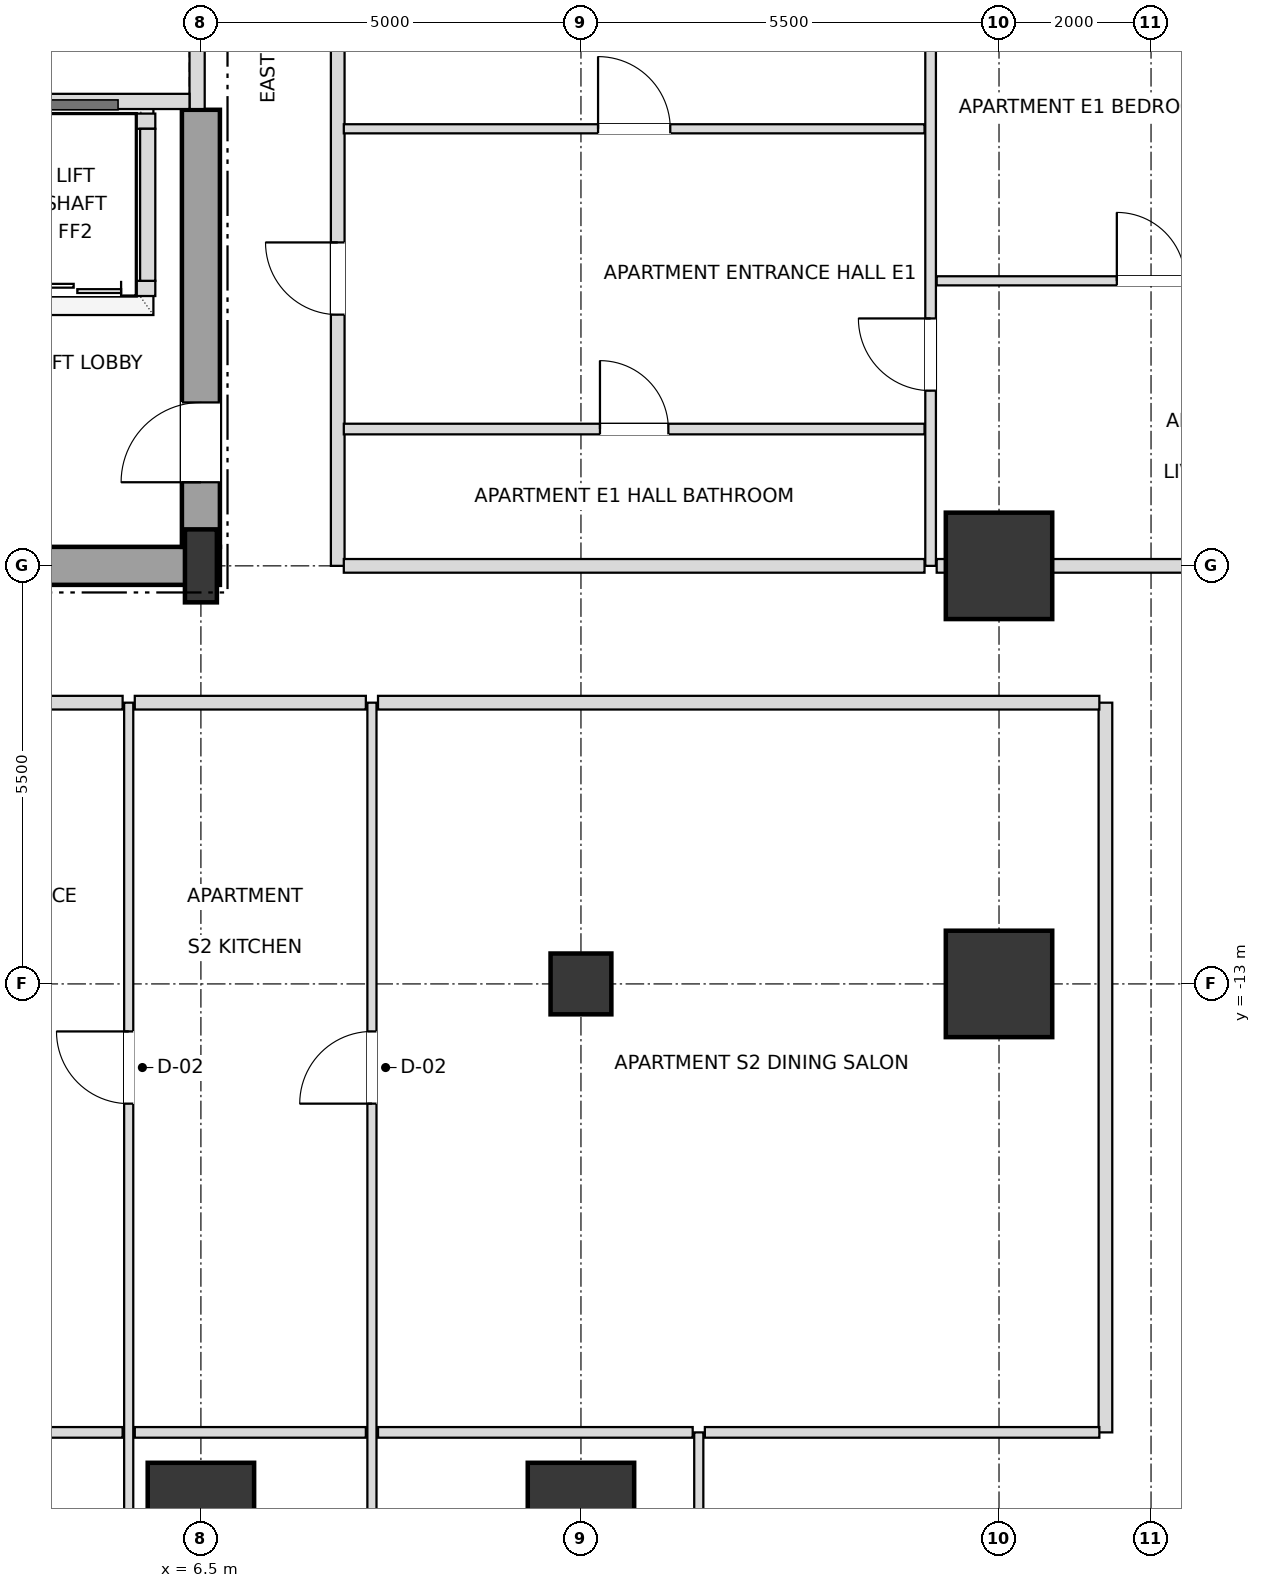
"""IFC4 building model, lengths in metres.
Left out: names, types, materials, properties, quantities, classifications, styles, units other than length and angle.
Written with IfcOpenShell. Run it as: python <this file> out.ifc"""

import sys

from ifc_helpers import new_model, si_unit, direction, frame, frame_2d, origin, origin_2d, place, context, subcontext, project, spatial, rectangle, i_section, extrude, element, fill, save


model = new_model("IFC4")
c1 = context("Model", 3, precision=1e-05, world=origin(), true_north=direction((0.0, 1.0)))
c2 = subcontext(c1, "Body", "Model", "MODEL_VIEW")
j1 = project(units=[si_unit("LENGTHUNIT", "METRE"), si_unit("PLANEANGLEUNIT", "RADIAN")], contexts=[c1])
p1 = place(None, origin())
s1 = spatial("IfcSite", under=j1, at=p1, CompositionType="ELEMENT")
p2 = place(p1, origin())
s2 = spatial("IfcBuilding", under=s1, at=p2, CompositionType="ELEMENT")
p3 = place(p2, frame((0.0, 0.0, 68.4)))
s3 = spatial("IfcBuildingStorey", under=s2, at=p3, CompositionType="ELEMENT", Elevation=68.4)
p4 = place(p3, frame((6.5, -7.5, 0.0), z_axis=(0.0, 0.0, 1.0), x_axis=(1.0, 0.0, 0.0)))
e1 = element("IfcColumn", 1, at=p4, inside=s3, PredefinedType="COLUMN", context=c2, shape_type="SweptSolid", body=[
    extrude(i_section(OverallWidth=0.42, OverallDepth=0.96, WebThickness=0.022, FlangeThickness=0.034, at=origin_2d()), origin(), (0.0, 0.0, 1.0), 3.6),
])
for number, where, z_axis, x_axis in (
    (2, (6.5, -20.0, 0.0), (0.0, 0.0, 1.0), (1.0, 0.0, 0.0)),
    (3, (11.5, -20.0, 0.0), (0.0, 0.0, 1.0), (1.0, 0.0, 0.0)),
    (4, (17.0, -13.0, 0.0), (0.0, 0.0, 1.0), (1.0, 0.0, 0.0)),
    (5, (17.0, -7.5, 0.0), (0.0, 0.0, 1.0), (1.0, 0.0, 0.0)),
):
    element("IfcColumn", number, at=place(p3, frame(where, z_axis=z_axis, x_axis=x_axis)), inside=s3, PredefinedType="USERDEFINED", context=c2, shape_type="SweptSolid", body=[
        extrude(rectangle(XDim=1.4, YDim=1.4, at=origin_2d()), origin(), (0.0, 0.0, 1.0), 3.6),
    ])
p5 = place(p3, frame((11.5, -13.0, 0.0), z_axis=(0.0, 0.0, 1.0), x_axis=(1.0, 0.0, 0.0)))
e6 = element("IfcColumn", 6, at=p5, inside=s3, PredefinedType="COLUMN", context=c2, shape_type="SweptSolid", body=[
    extrude(rectangle(XDim=0.8, YDim=0.8, at=origin_2d()), origin(), (0.0, 0.0, 1.0), 3.6),
])
p6 = place(p3, frame((0.0, -7.5, 0.0), z_axis=(0.0, 0.0, 1.0), x_axis=(1.0, 0.0, 0.0)))
e7 = element("IfcWall", 7, at=p6, inside=s3, PredefinedType="SHEAR", context=c2, shape_type="SweptSolid", body=[
    extrude(rectangle(XDim=6.75, YDim=0.5, at=frame_2d((3.375, 0.0))), origin(), (0.0, 0.0, 1.0), 3.38),
])
p7 = place(p3, frame((6.5, -7.25, 0.0), z_axis=(0.0, 0.0, 1.0), x_axis=(0.0, 1.0, 0.0)))
e8 = element("IfcWall", 8, at=p7, inside=s3, PredefinedType="SHEAR", context=c2, shape_type="SweptSolid", body=[
    extrude(rectangle(XDim=5.75, YDim=0.5, at=frame_2d((2.875, 0.0))), origin(), (0.0, 0.0, 1.0), 3.38),
])
p8 = place(p7, frame((0.85, 0.0, 0.0)))
e9 = element("IfcOpeningElement", 9, at=p8, cuts=e8, PredefinedType="OPENING", context=c2, shape_type="SweptSolid", body=[
    extrude(rectangle(XDim=1.05, YDim=2.15, at=frame_2d((0.525, 1.075))), frame((0.0, 0.26, 0.0), z_axis=(0.0, -1.0, 0.0), x_axis=(1.0, 0.0, 0.0)), (0.0, 0.0, 1.0), 0.52),
])
p9 = place(p3, frame((6.45, -1.49, 0.0), z_axis=(0.0, 0.0, 1.0), x_axis=(0.0, 1.0, 0.0)))
e10 = element("IfcWall", 10, at=p9, inside=s3, PredefinedType="SOLIDWALL", context=c2, shape_type="SweptSolid", body=[
    extrude(rectangle(XDim=5.58, YDim=0.2, at=frame_2d((2.79, 0.0))), origin(), (0.0, 0.0, 1.0), 2.816),
])
p10 = place(p3, frame((4.15, -1.39, 0.0), z_axis=(0.0, 0.0, 1.0), x_axis=(1.0, 0.0, 0.0)))
e11 = element("IfcWall", 11, at=p10, inside=s3, PredefinedType="SOLIDWALL", context=c2, shape_type="SweptSolid", body=[
    extrude(rectangle(XDim=2.2, YDim=0.2, at=frame_2d((1.1, 0.0))), origin(), (0.0, 0.0, 1.0), 3.38),
])
p11 = place(p3, frame((1.8, -3.85, 0.0), z_axis=(0.0, 0.0, 1.0), x_axis=(1.0, 0.0, 0.0)))
e12 = element("IfcWall", 12, at=p11, inside=s3, PredefinedType="SOLIDWALL", context=c2, shape_type="SweptSolid", body=[
    extrude(rectangle(XDim=4.1, YDim=0.2, at=frame_2d((2.05, 0.0))), origin(), (0.0, 0.0, 1.0), 3.38),
])
p12 = place(p11, frame((0.45, 0.0, 0.0)))
e13 = element("IfcOpeningElement", 13, at=p12, cuts=e12, PredefinedType="OPENING", context=c2, shape_type="SweptSolid", body=[
    extrude(rectangle(XDim=1.2, YDim=2.2, at=frame_2d((0.6, 1.1))), frame((0.0, 0.11, 0.0), z_axis=(0.0, -1.0, 0.0), x_axis=(1.0, 0.0, 0.0)), (0.0, 0.0, 1.0), 0.22),
])
p13 = place(p11, frame((2.45, 0.0, 0.0)))
e14 = element("IfcOpeningElement", 14, at=p13, cuts=e12, PredefinedType="OPENING", context=c2, shape_type="SweptSolid", body=[
    extrude(rectangle(XDim=1.2, YDim=2.2, at=frame_2d((0.6, 1.1))), frame((0.0, 0.11, 0.0), z_axis=(0.0, -1.0, 0.0), x_axis=(1.0, 0.0, 0.0)), (0.0, 0.0, 1.0), 0.22),
])
p14 = place(p3, frame((1.8, -1.65, 0.0), z_axis=(0.0, 0.0, 1.0), x_axis=(1.0, 0.0, 0.0)))
e15 = element("IfcWall", 15, at=p14, inside=s3, PredefinedType="SOLIDWALL", context=c2, shape_type="SweptSolid", body=[
    extrude(rectangle(XDim=4.1, YDim=0.2, at=frame_2d((2.05, 0.0))), origin(), (0.0, 0.0, 1.0), 3.38),
])
p15 = place(p3, frame((5.8, -3.75, 0.0), z_axis=(0.0, 0.0, 1.0), x_axis=(0.0, 1.0, 0.0)))
e16 = element("IfcWall", 16, at=p15, inside=s3, PredefinedType="SOLIDWALL", context=c2, shape_type="SweptSolid", body=[
    extrude(rectangle(XDim=2.0, YDim=0.2, at=frame_2d((1.0, 0.0))), origin(), (0.0, 0.0, 1.0), 3.38),
])
p16 = place(p3, frame((5.55, -24.9, 0.0), z_axis=(0.0, 0.0, 1.0), x_axis=(0.0, 1.0, 0.0)))
e17 = element("IfcWall", 17, at=p16, inside=s3, PredefinedType="PARTITIONING", context=c2, shape_type="SweptSolid", body=[
    extrude(rectangle(XDim=15.6, YDim=0.12, at=frame_2d((7.8, 0.0))), origin(), (0.0, 0.0, 1.0), 2.816),
])
p17 = place(p16, frame((10.325, 0.0, 0.0)))
e18 = element("IfcOpeningElement", 18, at=p17, cuts=e17, PredefinedType="OPENING", context=c2, shape_type="SweptSolid", body=[
    extrude(rectangle(XDim=0.95, YDim=2.1, at=frame_2d((0.475, 1.05))), frame((0.0, 0.07, 0.0), z_axis=(0.0, -1.0, 0.0), x_axis=(1.0, 0.0, 0.0)), (0.0, 0.0, 1.0), 0.14),
])
p18 = place(p16, frame((2.55, 0.0, 0.0)))
e19 = element("IfcOpeningElement", 19, at=p18, cuts=e17, PredefinedType="OPENING", context=c2, shape_type="SweptSolid", body=[
    extrude(rectangle(XDim=0.9, YDim=2.1, at=frame_2d((0.45, 1.05))), frame((0.0, 0.07, 0.0), z_axis=(0.0, -1.0, 0.0), x_axis=(1.0, 0.0, 0.0)), (0.0, 0.0, 1.0), 0.14),
])
p19 = place(p3, frame((8.3, -7.5, 0.0), z_axis=(0.0, 0.0, 1.0), x_axis=(0.0, 1.0, 0.0)))
e20 = element("IfcWall", 20, at=p19, inside=s3, PredefinedType="PARTITIONING", context=c2, shape_type="SweptSolid", body=[
    extrude(rectangle(XDim=15.0, YDim=0.18, at=frame_2d((7.5, 0.0))), origin(), (0.0, 0.0, 1.0), 3.38),
])
p20 = place(p19, frame((3.305, 0.0, 0.0)))
e21 = element("IfcOpeningElement", 21, at=p20, cuts=e20, PredefinedType="OPENING", context=c2, shape_type="SweptSolid", body=[
    extrude(rectangle(XDim=0.95, YDim=2.15, at=frame_2d((0.475, 1.075))), frame((0.0, 0.1, 0.0), z_axis=(0.0, -1.0, 0.0), x_axis=(1.0, 0.0, 0.0)), (0.0, 0.0, 1.0), 0.2),
])
p21 = place(p19, frame((10.805, 0.0, 0.0)))
e22 = element("IfcOpeningElement", 22, at=p21, cuts=e20, PredefinedType="OPENING", context=c2, shape_type="SweptSolid", body=[
    extrude(rectangle(XDim=0.95, YDim=2.15, at=frame_2d((0.475, 1.075))), frame((0.0, 0.1, 0.0), z_axis=(0.0, -1.0, 0.0), x_axis=(1.0, 0.0, 0.0)), (0.0, 0.0, 1.0), 0.2),
])
p22 = place(p3, frame((8.75, -24.9, 0.0), z_axis=(0.0, 0.0, 1.0), x_axis=(0.0, 1.0, 0.0)))
e23 = element("IfcWall", 23, at=p22, inside=s3, PredefinedType="PARTITIONING", context=c2, shape_type="SweptSolid", body=[
    extrude(rectangle(XDim=15.6, YDim=0.12, at=frame_2d((7.8, 0.0))), origin(), (0.0, 0.0, 1.0), 2.816),
])
p23 = place(p22, frame((10.325, 0.0, 0.0)))
e24 = element("IfcOpeningElement", 24, at=p23, cuts=e23, PredefinedType="OPENING", context=c2, shape_type="SweptSolid", body=[
    extrude(rectangle(XDim=0.95, YDim=2.1, at=frame_2d((0.475, 1.05))), frame((0.0, 0.07, 0.0), z_axis=(0.0, -1.0, 0.0), x_axis=(1.0, 0.0, 0.0)), (0.0, 0.0, 1.0), 0.14),
])
p24 = place(p22, frame((2.55, 0.0, 0.0)))
e25 = element("IfcOpeningElement", 25, at=p24, cuts=e23, PredefinedType="OPENING", context=c2, shape_type="SweptSolid", body=[
    extrude(rectangle(XDim=0.9, YDim=2.1, at=frame_2d((0.45, 1.05))), frame((0.0, 0.07, 0.0), z_axis=(0.0, -1.0, 0.0), x_axis=(1.0, 0.0, 0.0)), (0.0, 0.0, 1.0), 0.14),
])
p25 = place(p3, frame((13.05, -24.9, 0.0), z_axis=(0.0, 0.0, 1.0), x_axis=(0.0, 1.0, 0.0)))
e26 = element("IfcWall", 26, at=p25, inside=s3, PredefinedType="PARTITIONING", context=c2, shape_type="SweptSolid", body=[
    extrude(rectangle(XDim=6.0, YDim=0.12, at=frame_2d((3.0, 0.0))), origin(), (0.0, 0.0, 1.0), 2.736),
])
p26 = place(p25, frame((2.55, 0.0, 0.0)))
e27 = element("IfcOpeningElement", 27, at=p26, cuts=e26, PredefinedType="OPENING", context=c2, shape_type="SweptSolid", body=[
    extrude(rectangle(XDim=0.9, YDim=2.1, at=frame_2d((0.45, 1.05))), frame((0.0, 0.07, 0.0), z_axis=(0.0, -1.0, 0.0), x_axis=(1.0, 0.0, 0.0)), (0.0, 0.0, 1.0), 0.14),
])
p27 = place(p3, frame((16.1, -7.5, 0.0), z_axis=(0.0, 0.0, 1.0), x_axis=(0.0, 1.0, 0.0)))
e28 = element("IfcWall", 28, at=p27, inside=s3, PredefinedType="PARTITIONING", context=c2, shape_type="SweptSolid", body=[
    extrude(rectangle(XDim=15.0, YDim=0.14, at=frame_2d((7.5, 0.0))), origin(), (0.0, 0.0, 1.0), 3.38),
])
p28 = place(p27, frame((2.305, 0.0, 0.0)))
e29 = element("IfcOpeningElement", 29, at=p28, cuts=e28, PredefinedType="OPENING", context=c2, shape_type="SweptSolid", body=[
    extrude(rectangle(XDim=0.95, YDim=2.1, at=frame_2d((0.475, 1.05))), frame((0.0, 0.08, 0.0), z_axis=(0.0, -1.0, 0.0), x_axis=(1.0, 0.0, 0.0)), (0.0, 0.0, 1.0), 0.16),
])
p29 = place(p27, frame((10.105, 0.0, 0.0)))
e30 = element("IfcOpeningElement", 30, at=p29, cuts=e28, PredefinedType="OPENING", context=c2, shape_type="SweptSolid", body=[
    extrude(rectangle(XDim=0.95, YDim=2.1, at=frame_2d((0.475, 1.05))), frame((0.0, 0.08, 0.0), z_axis=(0.0, -1.0, 0.0), x_axis=(1.0, 0.0, 0.0)), (0.0, 0.0, 1.0), 0.16),
])
p30 = place(p3, frame((18.4, -18.9, 0.0), z_axis=(0.0, 0.0, 1.0), x_axis=(0.0, 1.0, 0.0)))
e31 = element("IfcWall", 31, at=p30, inside=s3, PredefinedType="PARTITIONING", context=c2, shape_type="SweptSolid", body=[
    extrude(rectangle(XDim=9.6, YDim=0.18, at=frame_2d((4.8, 0.0))), origin(), (0.0, 0.0, 1.0), 2.736),
])
p31 = place(p3, frame((1.43, -18.9, 0.0), z_axis=(0.0, 0.0, 1.0), x_axis=(1.0, 0.0, 0.0)))
e32 = element("IfcWall", 32, at=p31, inside=s3, PredefinedType="PARTITIONING", context=c2, shape_type="SweptSolid", body=[
    extrude(rectangle(XDim=4.04, YDim=0.14, at=frame_2d((2.02, 0.0))), origin(), (0.0, 0.0, 1.0), 3.38),
])
p32 = place(p31, frame((1.545, 0.0, 0.0)))
e33 = element("IfcOpeningElement", 33, at=p32, cuts=e32, PredefinedType="OPENING", context=c2, shape_type="SweptSolid", body=[
    extrude(rectangle(XDim=0.95, YDim=2.1, at=frame_2d((0.475, 1.05))), frame((0.0, 0.08, 0.0), z_axis=(0.0, -1.0, 0.0), x_axis=(1.0, 0.0, 0.0)), (0.0, 0.0, 1.0), 0.16),
])
p33 = place(p3, frame((5.63, -18.9, 0.0), z_axis=(0.0, 0.0, 1.0), x_axis=(1.0, 0.0, 0.0)))
e34 = element("IfcWall", 34, at=p33, inside=s3, PredefinedType="PARTITIONING", context=c2, shape_type="SweptSolid", body=[
    extrude(rectangle(XDim=3.04, YDim=0.14, at=frame_2d((1.52, 0.0))), origin(), (0.0, 0.0, 1.0), 2.816),
])
p34 = place(p3, frame((8.83, -18.9, 0.0), z_axis=(0.0, 0.0, 1.0), x_axis=(1.0, 0.0, 0.0)))
e35 = element("IfcWall", 35, at=p34, inside=s3, PredefinedType="PARTITIONING", context=c2, shape_type="SweptSolid", body=[
    extrude(rectangle(XDim=4.14, YDim=0.14, at=frame_2d((2.07, 0.0))), origin(), (0.0, 0.0, 1.0), 2.736),
])
p35 = place(p3, frame((13.13, -18.9, 0.0), z_axis=(0.0, 0.0, 1.0), x_axis=(1.0, 0.0, 0.0)))
e36 = element("IfcWall", 36, at=p35, inside=s3, PredefinedType="PARTITIONING", context=c2, shape_type="SweptSolid", body=[
    extrude(rectangle(XDim=5.19, YDim=0.14, at=frame_2d((2.595, 0.0))), origin(), (0.0, 0.0, 1.0), 2.736),
])
p36 = place(p3, frame((1.43, -9.3, 0.0), z_axis=(0.0, 0.0, 1.0), x_axis=(1.0, 0.0, 0.0)))
e37 = element("IfcWall", 37, at=p36, inside=s3, PredefinedType="PARTITIONING", context=c2, shape_type="SweptSolid", body=[
    extrude(rectangle(XDim=4.04, YDim=0.18, at=frame_2d((2.02, 0.0))), origin(), (0.0, 0.0, 1.0), 3.38),
])
p37 = place(p36, frame((1.545, 0.0, 0.0)))
e38 = element("IfcOpeningElement", 38, at=p37, cuts=e37, PredefinedType="OPENING", context=c2, shape_type="SweptSolid", body=[
    extrude(rectangle(XDim=0.95, YDim=2.15, at=frame_2d((0.475, 1.075))), frame((0.0, 0.1, 0.0), z_axis=(0.0, -1.0, 0.0), x_axis=(1.0, 0.0, 0.0)), (0.0, 0.0, 1.0), 0.2),
])
p38 = place(p3, frame((5.63, -9.3, 0.0), z_axis=(0.0, 0.0, 1.0), x_axis=(1.0, 0.0, 0.0)))
e39 = element("IfcWall", 39, at=p38, inside=s3, PredefinedType="PARTITIONING", context=c2, shape_type="SweptSolid", body=[
    extrude(rectangle(XDim=3.04, YDim=0.18, at=frame_2d((1.52, 0.0))), origin(), (0.0, 0.0, 1.0), 2.816),
])
p39 = place(p3, frame((8.83, -9.3, 0.0), z_axis=(0.0, 0.0, 1.0), x_axis=(1.0, 0.0, 0.0)))
e40 = element("IfcWall", 40, at=p39, inside=s3, PredefinedType="PARTITIONING", context=c2, shape_type="SweptSolid", body=[
    extrude(rectangle(XDim=9.49, YDim=0.18, at=frame_2d((4.745, 0.0))), origin(), (0.0, 0.0, 1.0), 2.816),
])
p40 = place(p3, frame((8.38, -7.5, 0.0), z_axis=(0.0, 0.0, 1.0), x_axis=(1.0, 0.0, 0.0)))
e41 = element("IfcWall", 41, at=p40, inside=s3, PredefinedType="PARTITIONING", context=c2, shape_type="SweptSolid", body=[
    extrude(rectangle(XDim=7.64, YDim=0.18, at=frame_2d((3.82, 0.0))), origin(), (0.0, 0.0, 1.0), 2.816),
])
p41 = place(p3, frame((16.18, -7.5, 0.0), z_axis=(0.0, 0.0, 1.0), x_axis=(1.0, 0.0, 0.0)))
e42 = element("IfcWall", 42, at=p41, inside=s3, PredefinedType="PARTITIONING", context=c2, shape_type="SweptSolid", body=[
    extrude(rectangle(XDim=5.72, YDim=0.18, at=frame_2d((2.86, 0.0))), origin(), (0.0, 0.0, 1.0), 2.816),
])
p42 = place(p3, frame((8.38, -5.7, 0.0), z_axis=(0.0, 0.0, 1.0), x_axis=(1.0, 0.0, 0.0)))
e43 = element("IfcWall", 43, at=p42, inside=s3, PredefinedType="PARTITIONING", context=c2, shape_type="SweptSolid", body=[
    extrude(rectangle(XDim=7.64, YDim=0.14, at=frame_2d((3.82, 0.0))), origin(), (0.0, 0.0, 1.0), 2.948),
])
p43 = place(p42, frame((3.37, 0.0, 0.0)))
e44 = element("IfcOpeningElement", 44, at=p43, cuts=e43, PredefinedType="OPENING", context=c2, shape_type="SweptSolid", body=[
    extrude(rectangle(XDim=0.9, YDim=2.1, at=frame_2d((0.45, 1.05))), frame((0.0, 0.08, 0.0), z_axis=(0.0, -1.0, 0.0), x_axis=(1.0, 0.0, 0.0)), (0.0, 0.0, 1.0), 0.16),
])
p44 = place(p3, frame((16.18, -3.75, 0.0), z_axis=(0.0, 0.0, 1.0), x_axis=(1.0, 0.0, 0.0)))
e45 = element("IfcWall", 45, at=p44, inside=s3, PredefinedType="PARTITIONING", context=c2, shape_type="SweptSolid", body=[
    extrude(rectangle(XDim=5.64, YDim=0.12, at=frame_2d((2.82, 0.0))), origin(), (0.0, 0.0, 1.0), 2.816),
])
p45 = place(p44, frame((2.37, 0.0, 0.0)))
e46 = element("IfcOpeningElement", 46, at=p45, cuts=e45, PredefinedType="OPENING", context=c2, shape_type="SweptSolid", body=[
    extrude(rectangle(XDim=0.9, YDim=2.1, at=frame_2d((0.45, 1.05))), frame((0.0, 0.07, 0.0), z_axis=(0.0, -1.0, 0.0), x_axis=(1.0, 0.0, 0.0)), (0.0, 0.0, 1.0), 0.14),
])
p46 = place(p3, frame((8.38, -1.75, 0.0), z_axis=(0.0, 0.0, 1.0), x_axis=(1.0, 0.0, 0.0)))
e47 = element("IfcWall", 47, at=p46, inside=s3, PredefinedType="PARTITIONING", context=c2, shape_type="SweptSolid", body=[
    extrude(rectangle(XDim=7.64, YDim=0.12, at=frame_2d((3.82, 0.0))), origin(), (0.0, 0.0, 1.0), 2.948),
])
p47 = place(p46, frame((3.345, 0.0, 0.0)))
e48 = element("IfcOpeningElement", 48, at=p47, cuts=e47, PredefinedType="OPENING", context=c2, shape_type="SweptSolid", body=[
    extrude(rectangle(XDim=0.95, YDim=2.1, at=frame_2d((0.475, 1.05))), frame((0.0, 0.07, 0.0), z_axis=(0.0, -1.0, 0.0), x_axis=(1.0, 0.0, 0.0)), (0.0, 0.0, 1.0), 0.14),
])
p48 = place(p8, origin())
e49 = element("IfcDoor", 49, at=p48, inside=s3, OperationType="SINGLE_SWING_LEFT", PredefinedType="DOOR", context=c2, shape_type="SweptSolid", body=[
    extrude(rectangle(XDim=1.05, YDim=2.15, at=frame_2d((0.525, 1.075))), frame((0.0, 0.025, 0.0), z_axis=(0.0, -1.0, 0.0), x_axis=(1.0, 0.0, 0.0)), (0.0, 0.0, 1.0), 0.05),
])
fill(e9, e49)
p49 = place(p13, origin())
e50 = element("IfcDoor", 50, at=p49, inside=s3, OperationType="DOUBLE_DOOR_SLIDING", PredefinedType="DOOR", context=c2, shape_type="SweptSolid", body=[
    extrude(rectangle(XDim=1.2, YDim=2.2, at=frame_2d((0.6, 1.1))), frame((0.0, 0.025, 0.0), z_axis=(0.0, -1.0, 0.0), x_axis=(1.0, 0.0, 0.0)), (0.0, 0.0, 1.0), 0.05),
])
fill(e14, e50)
p50 = place(p17, origin())
e51 = element("IfcDoor", 51, at=p50, inside=s3, OperationType="SINGLE_SWING_RIGHT", PredefinedType="DOOR", context=c2, shape_type="SweptSolid", body=[
    extrude(rectangle(XDim=0.95, YDim=2.1, at=frame_2d((0.475, 1.05))), frame((0.0, 0.025, 0.0), z_axis=(0.0, -1.0, 0.0), x_axis=(1.0, 0.0, 0.0)), (0.0, 0.0, 1.0), 0.05),
])
fill(e18, e51)
p51 = place(p23, origin())
e52 = element("IfcDoor", 52, at=p51, inside=s3, OperationType="SINGLE_SWING_LEFT", PredefinedType="DOOR", context=c2, shape_type="SweptSolid", body=[
    extrude(rectangle(XDim=0.95, YDim=2.1, at=frame_2d((0.475, 1.05))), frame((0.0, 0.025, 0.0), z_axis=(0.0, -1.0, 0.0), x_axis=(1.0, 0.0, 0.0)), (0.0, 0.0, 1.0), 0.05),
])
fill(e24, e52)
p52 = place(p43, origin())
e53 = element("IfcDoor", 53, at=p52, inside=s3, OperationType="SINGLE_SWING_LEFT", PredefinedType="DOOR", context=c2, shape_type="SweptSolid", body=[
    extrude(rectangle(XDim=0.9, YDim=2.1, at=frame_2d((0.45, 1.05))), frame((0.0, 0.025, 0.0), z_axis=(0.0, -1.0, 0.0), x_axis=(1.0, 0.0, 0.0)), (0.0, 0.0, 1.0), 0.05),
])
fill(e44, e53)
p53 = place(p20, origin())
e54 = element("IfcDoor", 54, at=p53, inside=s3, OperationType="SINGLE_SWING_RIGHT", PredefinedType="DOOR", context=c2, shape_type="SweptSolid", body=[
    extrude(rectangle(XDim=0.95, YDim=2.15, at=frame_2d((0.475, 1.075))), frame((0.0, 0.025, 0.0), z_axis=(0.0, -1.0, 0.0), x_axis=(1.0, 0.0, 0.0)), (0.0, 0.0, 1.0), 0.05),
])
fill(e21, e54)
p54 = place(p47, origin())
e55 = element("IfcDoor", 55, at=p54, inside=s3, OperationType="SINGLE_SWING_LEFT", PredefinedType="DOOR", context=c2, shape_type="SweptSolid", body=[
    extrude(rectangle(XDim=0.95, YDim=2.1, at=frame_2d((0.475, 1.05))), frame((0.0, 0.025, 0.0), z_axis=(0.0, -1.0, 0.0), x_axis=(1.0, 0.0, 0.0)), (0.0, 0.0, 1.0), 0.05),
])
fill(e48, e55)
p55 = place(p28, origin())
e56 = element("IfcDoor", 56, at=p55, inside=s3, OperationType="SINGLE_SWING_RIGHT", PredefinedType="DOOR", context=c2, shape_type="SweptSolid", body=[
    extrude(rectangle(XDim=0.95, YDim=2.1, at=frame_2d((0.475, 1.05))), frame((0.0, 0.025, 0.0), z_axis=(0.0, -1.0, 0.0), x_axis=(1.0, 0.0, 0.0)), (0.0, 0.0, 1.0), 0.05),
])
fill(e29, e56)
p56 = place(p45, origin())
e57 = element("IfcDoor", 57, at=p56, inside=s3, OperationType="SINGLE_SWING_LEFT", PredefinedType="DOOR", context=c2, shape_type="SweptSolid", body=[
    extrude(rectangle(XDim=0.9, YDim=2.1, at=frame_2d((0.45, 1.05))), frame((0.0, 0.025, 0.0), z_axis=(0.0, -1.0, 0.0), x_axis=(1.0, 0.0, 0.0)), (0.0, 0.0, 1.0), 0.05),
])
fill(e46, e57)
save(model, sys.argv[1])
